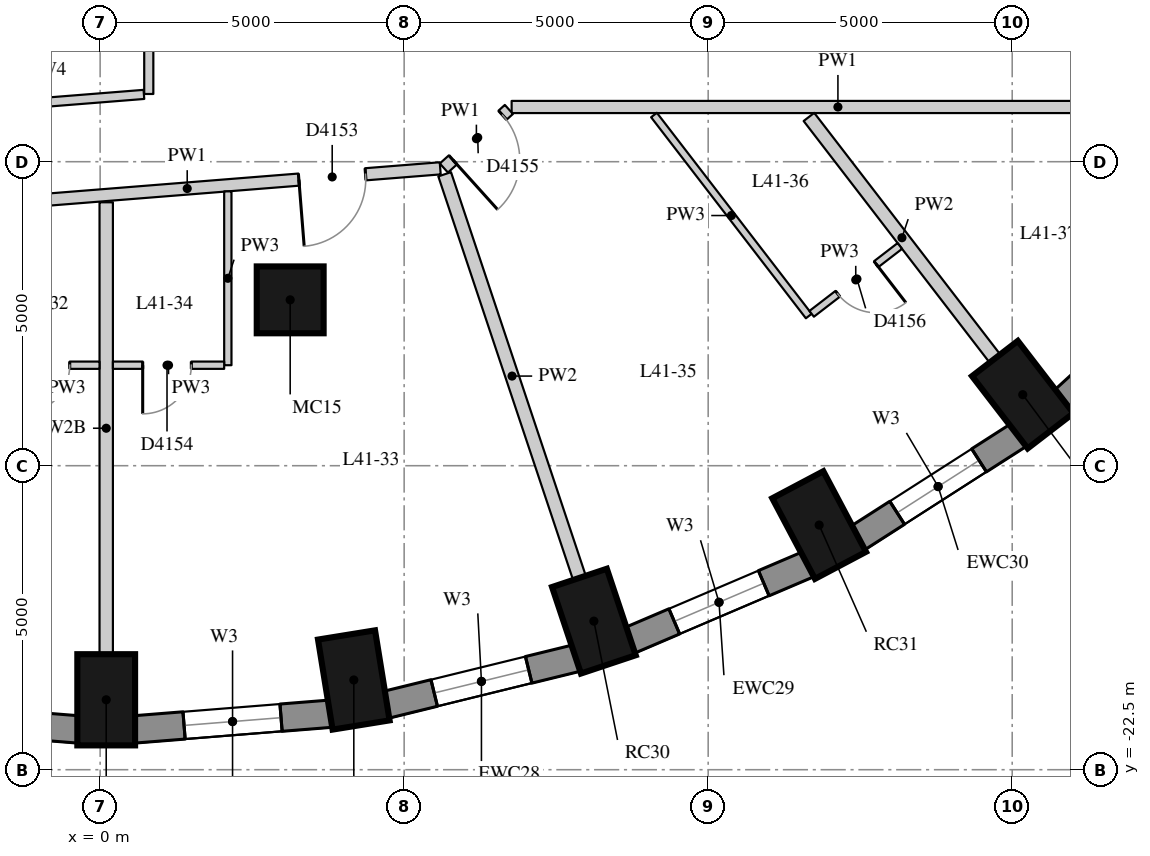
"""IFC4 building model, lengths in metres.
Left out: names, types, materials, properties, quantities, classifications, styles, units other than length and angle.
Written with IfcOpenShell. Run it as: python <this file> out.ifc"""

import sys

from ifc_helpers import new_model, si_unit, direction, frame, frame_2d, origin, origin_2d, place, context, subcontext, project, spatial, rectangle, extrude, element, fill, save


model = new_model("IFC4")
c1 = context("Model", 3, precision=1e-05, world=origin(), true_north=direction((0.0, 1.0)))
c2 = subcontext(c1, "Body", "Model", "MODEL_VIEW")
j1 = project(units=[si_unit("LENGTHUNIT", "METRE"), si_unit("PLANEANGLEUNIT", "RADIAN")], contexts=[c1])
p1 = place(None, origin())
s1 = spatial("IfcSite", under=j1, at=p1, CompositionType="ELEMENT")
p2 = place(p1, origin())
s2 = spatial("IfcBuilding", under=s1, at=p2, CompositionType="ELEMENT")
p3 = place(p2, frame((0.0, 0.0, 148.4)))
s3 = spatial("IfcBuildingStorey", under=s2, at=p3, CompositionType="ELEMENT", Elevation=148.4)
for number, where, z_axis, x_axis in (
    (1, (0.1, -21.35, 0.0), (0.0, 0.0, 1.0), (0.0, -1.0, 0.0)),
    (2, (4.172, -21.024, 0.0), (0.0, 0.0, 1.0), (0.16, -0.987, 0.0)),
    (3, (8.12, -20.056, 0.0), (0.0, 0.0, 1.0), (0.317, -0.949, 0.0)),
    (4, (11.825, -18.476, 0.0), (0.0, 0.0, 1.0), (0.468, -0.884, 0.0)),
    (5, (15.173, -16.332, 0.0), (0.0, 0.0, 1.0), (0.61, -0.792, 0.0)),
):
    element("IfcColumn", number, at=place(p3, frame(where, z_axis=z_axis, x_axis=x_axis)), inside=s3, PredefinedType="COLUMN", context=c2, shape_type="SweptSolid", body=[
        extrude(rectangle(XDim=1.5, YDim=0.95, at=origin_2d()), origin(), (0.0, 0.0, 1.0), 3.3),
    ])
p4 = place(p3, frame((3.126, -14.772, 0.0), z_axis=(0.0, 0.0, 1.0), x_axis=(1.0, 0.0, 0.0)))
e6 = element("IfcColumn", 6, at=p4, inside=s3, PredefinedType="COLUMN", context=c2, shape_type="SweptSolid", body=[
    extrude(rectangle(XDim=1.1, YDim=1.1, at=origin_2d()), origin(), (0.0, 0.0, 1.0), 3.3),
])
p5 = place(p3, frame((-3.601, -21.578, 0.0), z_axis=(0.0, 0.0, 1.0), x_axis=(0.996812416891, -0.079780984773, 0.0)))
e7 = element("IfcWall", 7, at=p5, inside=s3, PredefinedType="SOLIDWALL", context=c2, shape_type="SweptSolid", body=[
    extrude(rectangle(XDim=3.256, YDim=0.45, at=frame_2d((1.628, 0.0))), origin(), (0.0, 0.0, 1.0), 3.02),
])
p6 = place(p5, frame((0.828, 0.0, 0.4)))
e8 = element("IfcOpeningElement", 8, at=p6, cuts=e7, PredefinedType="OPENING", context=c2, shape_type="SweptSolid", body=[
    extrude(rectangle(XDim=1.6, YDim=1.75, at=frame_2d((0.8, 0.875))), frame((0.0, 0.235, 0.0), z_axis=(0.0, -1.0, 0.0), x_axis=(1.0, 0.0, 0.0)), (0.0, 0.0, 1.0), 0.47),
])
p7 = place(p3, frame((0.555, -21.838, 0.0), z_axis=(0.0, 0.0, 1.0), x_axis=(0.996812416891, 0.079780984773, 0.0)))
e9 = element("IfcWall", 9, at=p7, inside=s3, PredefinedType="SOLIDWALL", context=c2, shape_type="SweptSolid", body=[
    extrude(rectangle(XDim=3.256, YDim=0.45, at=frame_2d((1.628, 0.0))), origin(), (0.0, 0.0, 1.0), 3.02),
])
p8 = place(p7, frame((0.828, 0.0, 0.4)))
e10 = element("IfcOpeningElement", 10, at=p8, cuts=e9, PredefinedType="OPENING", context=c2, shape_type="SweptSolid", body=[
    extrude(rectangle(XDim=1.6, YDim=1.75, at=frame_2d((0.8, 0.875))), frame((0.0, 0.235, 0.0), z_axis=(0.0, -1.0, 0.0), x_axis=(1.0, 0.0, 0.0)), (0.0, 0.0, 1.0), 0.47),
])
p9 = place(p3, frame((4.699, -21.433, 0.0), z_axis=(0.0, 0.0, 1.0), x_axis=(0.971237178372, 0.238114139328, 0.0)))
e11 = element("IfcWall", 11, at=p9, inside=s3, PredefinedType="SOLIDWALL", context=c2, shape_type="SweptSolid", body=[
    extrude(rectangle(XDim=3.237, YDim=0.45, at=frame_2d((1.618, 0.0))), origin(), (0.0, 0.0, 1.0), 3.02),
])
p10 = place(p9, frame((0.818, 0.0, 0.4)))
e12 = element("IfcOpeningElement", 12, at=p10, cuts=e11, PredefinedType="OPENING", context=c2, shape_type="SweptSolid", body=[
    extrude(rectangle(XDim=1.6, YDim=1.75, at=frame_2d((0.8, 0.875))), frame((0.0, 0.235, 0.0), z_axis=(0.0, -1.0, 0.0), x_axis=(1.0, 0.0, 0.0)), (0.0, 0.0, 1.0), 0.47),
])
p11 = place(p3, frame((8.706, -20.375, 0.0), z_axis=(0.0, 0.0, 1.0), x_axis=(0.91981046949, 0.392362969986, 0.0)))
e13 = element("IfcWall", 13, at=p11, inside=s3, PredefinedType="SOLIDWALL", context=c2, shape_type="SweptSolid", body=[
    extrude(rectangle(XDim=3.201, YDim=0.45, at=frame_2d((1.6, 0.0))), origin(), (0.0, 0.0, 1.0), 3.02),
])
p12 = place(p11, frame((0.8, 0.0, 0.4)))
e14 = element("IfcOpeningElement", 14, at=p12, cuts=e13, PredefinedType="OPENING", context=c2, shape_type="SweptSolid", body=[
    extrude(rectangle(XDim=1.6, YDim=1.75, at=frame_2d((0.8, 0.875))), frame((0.0, 0.235, 0.0), z_axis=(0.0, -1.0, 0.0), x_axis=(1.0, 0.0, 0.0)), (0.0, 0.0, 1.0), 0.47),
])
p13 = place(p3, frame((12.455, -18.693, 0.0), z_axis=(0.0, 0.0, 1.0), x_axis=(0.842065914439, 0.539374633943, 0.0)))
e15 = element("IfcWall", 15, at=p13, inside=s3, PredefinedType="SOLIDWALL", context=c2, shape_type="SweptSolid", body=[
    extrude(rectangle(XDim=3.151, YDim=0.45, at=frame_2d((1.576, 0.0))), origin(), (0.0, 0.0, 1.0), 3.02),
])
p14 = place(p13, frame((0.776, 0.0, 0.4)))
e16 = element("IfcOpeningElement", 16, at=p14, cuts=e15, PredefinedType="OPENING", context=c2, shape_type="SweptSolid", body=[
    extrude(rectangle(XDim=1.6, YDim=1.75, at=frame_2d((0.8, 0.875))), frame((0.0, 0.235, 0.0), z_axis=(0.0, -1.0, 0.0), x_axis=(1.0, 0.0, 0.0)), (0.0, 0.0, 1.0), 0.47),
])
p15 = place(p3, frame((15.83, -16.439, 0.0), z_axis=(0.0, 0.0, 1.0), x_axis=(0.737808755941, 0.675009807082, 0.0)))
e17 = element("IfcWall", 17, at=p15, inside=s3, PredefinedType="SOLIDWALL", context=c2, shape_type="SweptSolid", body=[
    extrude(rectangle(XDim=3.094, YDim=0.45, at=frame_2d((1.547, 0.0))), origin(), (0.0, 0.0, 1.0), 3.02),
])
p16 = place(p3, frame((17.5, -11.6, 0.0), z_axis=(0.0, 0.0, 1.0), x_axis=(-1.0, 0.0, 0.0)))
e18 = element("IfcWall", 18, at=p16, inside=s3, PredefinedType="PARTITIONING", context=c2, shape_type="SweptSolid", body=[
    extrude(rectangle(XDim=10.732, YDim=0.2, at=frame_2d((5.366, 0.0))), origin(), (0.0, 0.0, 1.0), 3.02),
])
p17 = place(p3, frame((6.723, -11.64, 0.0), z_axis=(0.0, 0.0, 1.0), x_axis=(-0.743032656565, -0.669255161562, 0.0)))
e19 = element("IfcWall", 19, at=p17, inside=s3, PredefinedType="PARTITIONING", context=c2, shape_type="SweptSolid", body=[
    extrude(rectangle(XDim=1.439, YDim=0.2, at=frame_2d((0.72, 0.0))), origin(), (0.0, 0.0, 1.0), 3.02),
])
p18 = place(p17, frame((0.14, 0.0, 0.0)))
e20 = element("IfcOpeningElement", 20, at=p18, cuts=e19, PredefinedType="OPENING", context=c2, shape_type="SweptSolid", body=[
    extrude(rectangle(XDim=1.1, YDim=2.1, at=frame_2d((0.55, 1.05))), frame((0.0, 0.11, 0.0), z_axis=(0.0, -1.0, 0.0), x_axis=(1.0, 0.0, 0.0)), (0.0, 0.0, 1.0), 0.22),
])
p19 = place(p3, frame((5.593, -12.609, 0.0), z_axis=(0.0, 0.0, 1.0), x_axis=(-0.99682930336, -0.079569717626, 0.0)))
e21 = element("IfcWall", 21, at=p19, inside=s3, PredefinedType="PARTITIONING", context=c2, shape_type="SweptSolid", body=[
    extrude(rectangle(XDim=8.349, YDim=0.2, at=frame_2d((4.174, 0.0))), origin(), (0.0, 0.0, 1.0), 3.02),
])
p20 = place(p19, frame((1.232, 0.0, 0.0)))
e22 = element("IfcOpeningElement", 22, at=p20, cuts=e21, PredefinedType="OPENING", context=c2, shape_type="SweptSolid", body=[
    extrude(rectangle(XDim=1.1, YDim=2.1, at=frame_2d((0.55, 1.05))), frame((0.0, 0.11, 0.0), z_axis=(0.0, -1.0, 0.0), x_axis=(1.0, 0.0, 0.0)), (0.0, 0.0, 1.0), 0.22),
])
p21 = place(p3, frame((0.8, -9.23, 0.0), z_axis=(0.0, 0.0, 1.0), x_axis=(0.0, -1.0, 0.0)))
e23 = element("IfcWall", 23, at=p21, inside=s3, PredefinedType="PARTITIONING", context=c2, shape_type="SweptSolid", body=[
    extrude(rectangle(XDim=2.156, YDim=0.15, at=frame_2d((1.078, 0.0))), origin(), (0.0, 0.0, 1.0), 3.02),
])
p22 = place(p3, frame((0.72, -11.393, 0.0), z_axis=(0.0, 0.0, 1.0), x_axis=(-0.996836626024, -0.079477927865, 0.0)))
e24 = element("IfcWall", 24, at=p22, inside=s3, PredefinedType="PARTITIONING", context=c2, shape_type="SweptSolid", body=[
    extrude(rectangle(XDim=3.195, YDim=0.15, at=frame_2d((1.597, 0.0))), origin(), (0.0, 0.0, 1.0), 3.02),
])
p23 = place(p3, frame((0.1, -20.6, 0.0), z_axis=(0.0, 0.0, 1.0), x_axis=(0.0, 1.0, 0.0)))
e25 = element("IfcWall", 25, at=p23, inside=s3, PredefinedType="PARTITIONING", context=c2, shape_type="SweptSolid", body=[
    extrude(rectangle(XDim=7.433, YDim=0.22, at=frame_2d((3.716, 0.0))), origin(), (0.0, 0.0, 1.0), 2.57),
])
p24 = place(p3, frame((7.883, -19.345, 0.0), z_axis=(0.0, 0.0, 1.0), x_axis=(-0.31671959997, 0.948519211716, 0.0)))
e26 = element("IfcWall", 26, at=p24, inside=s3, PredefinedType="PARTITIONING", context=c2, shape_type="SweptSolid", body=[
    extrude(rectangle(XDim=6.999, YDim=0.22, at=frame_2d((3.499, 0.0))), origin(), (0.0, 0.0, 1.0), 3.02),
])
p25 = place(p3, frame((14.716, -15.737, 0.0), z_axis=(0.0, 0.0, 1.0), x_axis=(-0.609986007715, 0.792412184657, 0.0)))
e27 = element("IfcWall", 27, at=p25, inside=s3, PredefinedType="PARTITIONING", context=c2, shape_type="SweptSolid", body=[
    extrude(rectangle(XDim=5.015, YDim=0.22, at=frame_2d((2.507, 0.0))), origin(), (0.0, 0.0, 1.0), 3.02),
])
p26 = place(p3, frame((2.1, -12.988, 0.0), z_axis=(0.0, 0.0, 1.0), x_axis=(0.0, -1.0, 0.0)))
e28 = element("IfcWall", 28, at=p26, inside=s3, PredefinedType="PARTITIONING", context=c2, shape_type="SweptSolid", body=[
    extrude(rectangle(XDim=2.859, YDim=0.12, at=frame_2d((1.43, 0.0))), origin(), (0.0, 0.0, 1.0), 3.02),
])
p27 = place(p3, frame((9.109, -11.732, 0.0), z_axis=(0.0, 0.0, 1.0), x_axis=(0.609996270026, -0.79240428479, 0.0)))
e29 = element("IfcWall", 29, at=p27, inside=s3, PredefinedType="PARTITIONING", context=c2, shape_type="SweptSolid", body=[
    extrude(rectangle(XDim=4.173, YDim=0.12, at=frame_2d((2.087, 0.0))), origin(), (0.0, 0.0, 1.0), 3.02),
])
p28 = place(p3, frame((-1.84, -15.847, 0.0), z_axis=(0.0, 0.0, 1.0), x_axis=(1.0, 0.0, 0.0)))
e30 = element("IfcWall", 30, at=p28, inside=s3, PredefinedType="PARTITIONING", context=c2, shape_type="SweptSolid", body=[
    extrude(rectangle(XDim=1.83, YDim=0.12, at=frame_2d((0.915, 0.0))), origin(), (0.0, 0.0, 1.0), 3.02),
])
p29 = place(p28, frame((0.54, 0.0, 0.0)))
e31 = element("IfcOpeningElement", 31, at=p29, cuts=e30, PredefinedType="OPENING", context=c2, shape_type="SweptSolid", body=[
    extrude(rectangle(XDim=0.8, YDim=2.1, at=frame_2d((0.4, 1.05))), frame((0.0, 0.07, 0.0), z_axis=(0.0, -1.0, 0.0), x_axis=(1.0, 0.0, 0.0)), (0.0, 0.0, 1.0), 0.14),
])
p30 = place(p3, frame((2.04, -15.847, 0.0), z_axis=(0.0, 0.0, 1.0), x_axis=(-1.0, 0.0, 0.0)))
e32 = element("IfcWall", 32, at=p30, inside=s3, PredefinedType="PARTITIONING", context=c2, shape_type="SweptSolid", body=[
    extrude(rectangle(XDim=1.83, YDim=0.12, at=frame_2d((0.915, 0.0))), origin(), (0.0, 0.0, 1.0), 3.02),
])
p31 = place(p30, frame((0.54, 0.0, 0.0)))
e33 = element("IfcOpeningElement", 33, at=p31, cuts=e32, PredefinedType="OPENING", context=c2, shape_type="SweptSolid", body=[
    extrude(rectangle(XDim=0.8, YDim=2.1, at=frame_2d((0.4, 1.05))), frame((0.0, 0.07, 0.0), z_axis=(0.0, -1.0, 0.0), x_axis=(1.0, 0.0, 0.0)), (0.0, 0.0, 1.0), 0.14),
])
p32 = place(p3, frame((11.702, -15.002, 0.0), z_axis=(0.0, 0.0, 1.0), x_axis=(0.792395776304, 0.610007322657, 0.0)))
e34 = element("IfcWall", 34, at=p32, inside=s3, PredefinedType="PARTITIONING", context=c2, shape_type="SweptSolid", body=[
    extrude(rectangle(XDim=1.83, YDim=0.12, at=frame_2d((0.915, 0.0))), origin(), (0.0, 0.0, 1.0), 3.02),
])
p33 = place(p32, frame((0.54, 0.0, 0.0)))
e35 = element("IfcOpeningElement", 35, at=p33, cuts=e34, PredefinedType="OPENING", context=c2, shape_type="SweptSolid", body=[
    extrude(rectangle(XDim=0.8, YDim=2.1, at=frame_2d((0.4, 1.05))), frame((0.0, 0.07, 0.0), z_axis=(0.0, -1.0, 0.0), x_axis=(1.0, 0.0, 0.0)), (0.0, 0.0, 1.0), 0.14),
])
p34 = place(p8, origin())
e36 = element("IfcWindow", 36, at=p34, inside=s3, PartitioningType="SINGLE_PANEL", PredefinedType="WINDOW", context=c2, shape_type="SweptSolid", body=[
    extrude(rectangle(XDim=1.6, YDim=1.75, at=frame_2d((0.8, 0.875))), frame((0.0, 0.035, 0.0), z_axis=(0.0, -1.0, 0.0), x_axis=(1.0, 0.0, 0.0)), (0.0, 0.0, 1.0), 0.06),
])
fill(e10, e36)
p35 = place(p10, origin())
e37 = element("IfcWindow", 37, at=p35, inside=s3, PartitioningType="SINGLE_PANEL", PredefinedType="WINDOW", context=c2, shape_type="SweptSolid", body=[
    extrude(rectangle(XDim=1.6, YDim=1.75, at=frame_2d((0.8, 0.875))), frame((0.0, 0.035, 0.0), z_axis=(0.0, -1.0, 0.0), x_axis=(1.0, 0.0, 0.0)), (0.0, 0.0, 1.0), 0.06),
])
fill(e12, e37)
p36 = place(p12, origin())
e38 = element("IfcWindow", 38, at=p36, inside=s3, PartitioningType="SINGLE_PANEL", PredefinedType="WINDOW", context=c2, shape_type="SweptSolid", body=[
    extrude(rectangle(XDim=1.6, YDim=1.75, at=frame_2d((0.8, 0.875))), frame((0.0, 0.035, 0.0), z_axis=(0.0, -1.0, 0.0), x_axis=(1.0, 0.0, 0.0)), (0.0, 0.0, 1.0), 0.06),
])
fill(e14, e38)
p37 = place(p14, origin())
e39 = element("IfcWindow", 39, at=p37, inside=s3, PartitioningType="SINGLE_PANEL", PredefinedType="WINDOW", context=c2, shape_type="SweptSolid", body=[
    extrude(rectangle(XDim=1.6, YDim=1.75, at=frame_2d((0.8, 0.875))), frame((0.0, 0.035, 0.0), z_axis=(0.0, -1.0, 0.0), x_axis=(1.0, 0.0, 0.0)), (0.0, 0.0, 1.0), 0.06),
])
fill(e16, e39)
p38 = place(p29, origin())
e40 = element("IfcDoor", 40, at=p38, inside=s3, OperationType="SINGLE_SWING_RIGHT", PredefinedType="DOOR", context=c2, shape_type="SweptSolid", body=[
    extrude(rectangle(XDim=0.8, YDim=2.1, at=frame_2d((0.4, 1.05))), frame((0.0, 0.025, 0.0), z_axis=(0.0, -1.0, 0.0), x_axis=(1.0, 0.0, 0.0)), (0.0, 0.0, 1.0), 0.05),
])
fill(e31, e40)
p39 = place(p20, origin())
e41 = element("IfcDoor", 41, at=p39, inside=s3, OperationType="SINGLE_SWING_RIGHT", PredefinedType="DOOR", context=c2, shape_type="SweptSolid", body=[
    extrude(rectangle(XDim=1.1, YDim=2.1, at=frame_2d((0.55, 1.05))), frame((0.0, 0.025, 0.0), z_axis=(0.0, -1.0, 0.0), x_axis=(1.0, 0.0, 0.0)), (0.0, 0.0, 1.0), 0.05),
])
fill(e22, e41)
p40 = place(p31, origin())
e42 = element("IfcDoor", 42, at=p40, inside=s3, OperationType="SINGLE_SWING_RIGHT", PredefinedType="DOOR", context=c2, shape_type="SweptSolid", body=[
    extrude(rectangle(XDim=0.8, YDim=2.1, at=frame_2d((0.4, 1.05))), frame((0.0, 0.025, 0.0), z_axis=(0.0, -1.0, 0.0), x_axis=(1.0, 0.0, 0.0)), (0.0, 0.0, 1.0), 0.05),
])
fill(e33, e42)
p41 = place(p18, origin())
e43 = element("IfcDoor", 43, at=p41, inside=s3, OperationType="SINGLE_SWING_RIGHT", PredefinedType="DOOR", context=c2, shape_type="SweptSolid", body=[
    extrude(rectangle(XDim=1.1, YDim=2.1, at=frame_2d((0.55, 1.05))), frame((0.0, 0.025, 0.0), z_axis=(0.0, -1.0, 0.0), x_axis=(1.0, 0.0, 0.0)), (0.0, 0.0, 1.0), 0.05),
])
fill(e20, e43)
p42 = place(p33, origin())
e44 = element("IfcDoor", 44, at=p42, inside=s3, OperationType="SINGLE_SWING_LEFT", PredefinedType="DOOR", context=c2, shape_type="SweptSolid", body=[
    extrude(rectangle(XDim=0.8, YDim=2.1, at=frame_2d((0.4, 1.05))), frame((0.0, 0.025, 0.0), z_axis=(0.0, -1.0, 0.0), x_axis=(1.0, 0.0, 0.0)), (0.0, 0.0, 1.0), 0.05),
])
fill(e35, e44)
save(model, sys.argv[1])
